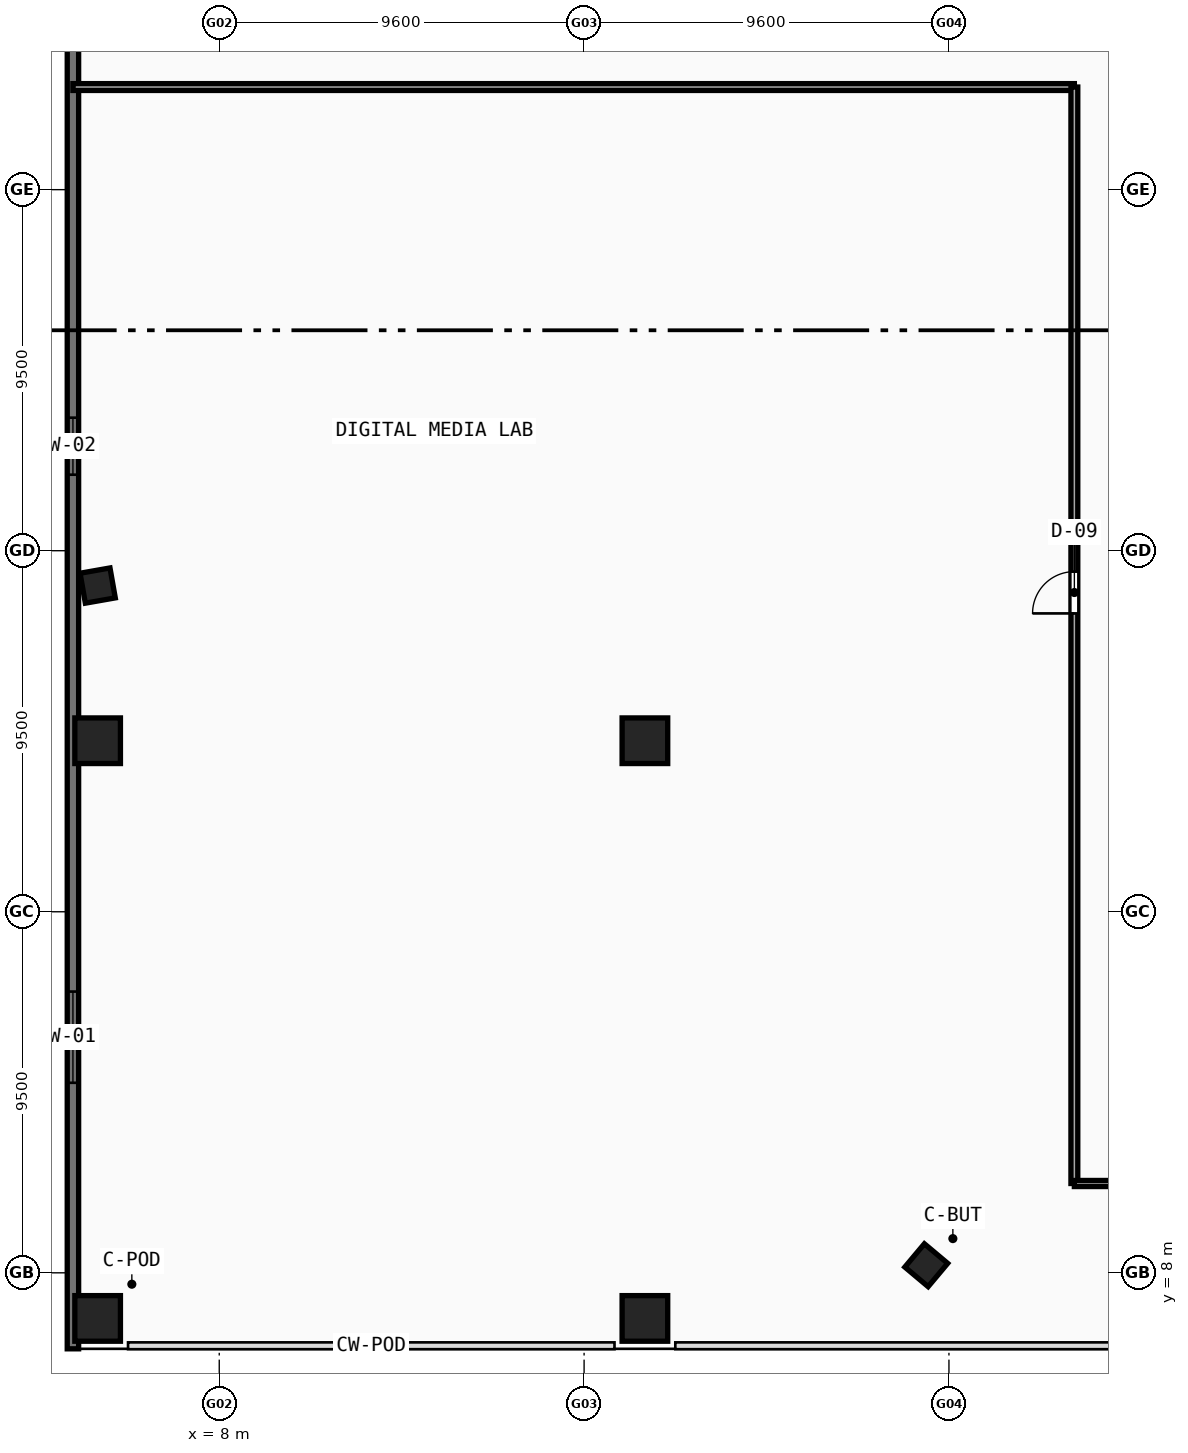
"""IFC4 building model, lengths in metres.
Left out: names, types, materials, properties, quantities, classifications, styles, units other than length and angle.
Written with IfcOpenShell. Run it as: python <this file> out.ifc"""

import sys

from ifc_helpers import new_model, si_unit, direction, frame, frame_2d, origin, origin_with_axes, origin_2d, place, context, subcontext, project, spatial, rectangle, hollow_rectangle, extrude, source, transform, mapped, element, fill, save


model = new_model("IFC4")
c1 = context("Model", 3, precision=1e-05, world=origin(), true_north=direction((0.0, 1.0)))
c2 = subcontext(c1, "Body", "Model", "MODEL_VIEW")
j1 = project(units=[si_unit("LENGTHUNIT", "METRE"), si_unit("PLANEANGLEUNIT", "RADIAN")], contexts=[c1])
p1 = place(None, origin())
s1 = spatial("IfcSite", under=j1, at=p1, CompositionType="ELEMENT")
p2 = place(p1, origin())
s2 = spatial("IfcBuilding", under=s1, at=p2, CompositionType="ELEMENT")
p3 = place(p2, frame((0.0, 0.0, 14.4)))
s3 = spatial("IfcBuildingStorey", under=s2, at=p3, CompositionType="ELEMENT", Elevation=14.4)
m1 = source(origin(), c2, "Body", "SweptSolid", [
    extrude(hollow_rectangle(XDim=1.2, YDim=1.2, WallThickness=0.05, at=origin_2d()), origin(), (0.0, 0.0, 1.0), 4.8),
])
for number, where, z_axis, x_axis in (
    (1, (4.8, 6.8, -0.28), (0.0, 0.0, 1.0), (1.0, 0.0, 0.0)),
    (2, (4.8, 22.0, -0.28), (0.0, 0.0, 1.0), (1.0, 0.0, 0.0)),
    (3, (19.2, 6.8, -0.28), (0.0, 0.0, 1.0), (1.0, 0.0, 0.0)),
    (4, (19.2, 22.0, -0.28), (0.0, 0.0, 1.0), (1.0, 0.0, 0.0)),
):
    element("IfcColumn", number, at=place(p3, frame(where, z_axis=z_axis, x_axis=x_axis)), inside=s3, PredefinedType="COLUMN", context=c2, shape_type="MappedRepresentation", body=[
        mapped(m1, transform((0.0, 0.0, 0.0), scale=1.0)),
    ])
m2 = source(origin(), c2, "Body", "SweptSolid", [
    extrude(hollow_rectangle(XDim=0.8, YDim=0.8, WallThickness=0.032, at=origin_2d()), origin(), (0.0, 0.0, 1.0), 4.8),
])
for number, where, z_axis, x_axis in (
    (5, (26.603, 8.2, -0.28), (0.0, 0.0, 1.0), (0.766, -0.643, 0.0)),
    (6, (4.801, 26.083, -0.28), (0.0, 0.0, 1.0), (0.174, -0.985, 0.0)),
):
    element("IfcColumn", number, at=place(p3, frame(where, z_axis=z_axis, x_axis=x_axis)), inside=s3, PredefinedType="COLUMN", context=c2, shape_type="MappedRepresentation", body=[
        mapped(m2, transform((0.0, 0.0, 0.0), scale=1.0)),
    ])
p4 = place(p3, frame((4.15, 6.0, 0.0), z_axis=(0.0, 0.0, 1.0), x_axis=(0.0, 1.0, 0.0)))
e7 = element("IfcWall", 7, at=p4, inside=s3, PredefinedType="STANDARD", context=c2, shape_type="SweptSolid", body=[
    extrude(rectangle(XDim=76.0, YDim=0.3, at=frame_2d((38.0, 0.0))), origin(), (0.0, 0.0, 1.0), 4.52),
])
p5 = place(p4, frame((7.0, 0.0, 0.9)))
e8 = element("IfcOpeningElement", 8, at=p5, cuts=e7, PredefinedType="OPENING", context=c2, shape_type="SweptSolid", body=[
    extrude(rectangle(XDim=2.4, YDim=1.8, at=frame_2d((1.2, 0.9))), frame((0.0, 0.16, 0.0), z_axis=(0.0, -1.0, 0.0), x_axis=(1.0, 0.0, 0.0)), (0.0, 0.0, 1.0), 0.32),
])
p6 = place(p4, frame((23.0, 0.0, 0.9)))
e9 = element("IfcOpeningElement", 9, at=p6, cuts=e7, PredefinedType="OPENING", context=c2, shape_type="SweptSolid", body=[
    extrude(rectangle(XDim=1.5, YDim=1.6, at=frame_2d((0.75, 0.8))), frame((0.0, 0.16, 0.0), z_axis=(0.0, -1.0, 0.0), x_axis=(1.0, 0.0, 0.0)), (0.0, 0.0, 1.0), 0.32),
])
p7 = place(p4, frame((43.0, 0.0, 0.9)))
e10 = element("IfcOpeningElement", 10, at=p7, cuts=e7, PredefinedType="OPENING", context=c2, shape_type="SweptSolid", body=[
    extrude(rectangle(XDim=2.4, YDim=1.8, at=frame_2d((1.2, 0.9))), frame((0.0, 0.16, 0.0), z_axis=(0.0, -1.0, 0.0), x_axis=(1.0, 0.0, 0.0)), (0.0, 0.0, 1.0), 0.32),
])
p8 = place(p4, frame((63.0, 0.0, 0.9)))
e11 = element("IfcOpeningElement", 11, at=p8, cuts=e7, PredefinedType="OPENING", context=c2, shape_type="SweptSolid", body=[
    extrude(rectangle(XDim=1.5, YDim=1.6, at=frame_2d((0.75, 0.8))), frame((0.0, 0.16, 0.0), z_axis=(0.0, -1.0, 0.0), x_axis=(1.0, 0.0, 0.0)), (0.0, 0.0, 1.0), 0.32),
])
p9 = place(p3, frame((4.15, 39.2, 0.0), z_axis=(0.0, 0.0, 1.0), x_axis=(1.0, 0.0, 0.0)))
e12 = element("IfcWall", 12, at=p9, inside=s3, PredefinedType="PARTITIONING", context=c2, shape_type="SweptSolid", body=[
    extrude(rectangle(XDim=26.35, YDim=0.18, at=frame_2d((13.175, 0.0))), origin(), (0.0, 0.0, 1.0), 3.62),
])
p10 = place(p3, frame((30.5, 10.35, 0.0), z_axis=(0.0, 0.0, 1.0), x_axis=(0.0, 1.0, 0.0)))
e13 = element("IfcWall", 13, at=p10, inside=s3, PredefinedType="PARTITIONING", context=c2, shape_type="SweptSolid", body=[
    extrude(rectangle(XDim=28.85, YDim=0.18, at=frame_2d((14.425, 0.0))), origin(), (0.0, 0.0, 1.0), 3.62),
])
p11 = place(p10, frame((15.0, 0.0, 0.0)))
e14 = element("IfcOpeningElement", 14, at=p11, cuts=e13, PredefinedType="OPENING", context=c2, shape_type="SweptSolid", body=[
    extrude(rectangle(XDim=1.1, YDim=2.15, at=frame_2d((0.55, 1.075))), frame((0.0, 0.1, 0.0), z_axis=(0.0, -1.0, 0.0), x_axis=(1.0, 0.0, 0.0)), (0.0, 0.0, 1.0), 0.2),
])
p12 = place(p3, frame((30.5, 10.35, 0.0), z_axis=(0.0, 0.0, 1.0), x_axis=(1.0, 0.0, 0.0)))
e15 = element("IfcWall", 15, at=p12, inside=s3, PredefinedType="PARTITIONING", context=c2, shape_type="SweptSolid", body=[
    extrude(rectangle(XDim=35.0, YDim=0.16, at=frame_2d((17.5, 0.0))), origin(), (0.0, 0.0, 1.0), 3.62),
])
m3 = source(origin(), c2, "Body", "SweptSolid", [
    extrude(rectangle(XDim=2.4, YDim=1.8, at=frame_2d((1.2, 0.9))), frame((0.0, 0.03, 0.0), z_axis=(0.0, -1.0, 0.0), x_axis=(1.0, 0.0, 0.0)), (0.0, 0.0, 1.0), 0.06),
])
p13 = place(p5, origin_with_axes())
e16 = element("IfcWindow", 16, at=p13, inside=s3, PartitioningType="SINGLE_PANEL", PredefinedType="WINDOW", context=c2, shape_type="MappedRepresentation", body=[
    mapped(m3, transform((0.0, 0.0, 0.0), scale=1.0)),
])
fill(e8, e16)
m4 = source(origin(), c2, "Body", "SweptSolid", [
    extrude(rectangle(XDim=1.5, YDim=1.6, at=frame_2d((0.75, 0.8))), frame((0.0, 0.03, 0.0), z_axis=(0.0, -1.0, 0.0), x_axis=(1.0, 0.0, 0.0)), (0.0, 0.0, 1.0), 0.06),
])
p14 = place(p6, origin_with_axes())
e17 = element("IfcWindow", 17, at=p14, inside=s3, PartitioningType="SINGLE_PANEL", PredefinedType="WINDOW", context=c2, shape_type="MappedRepresentation", body=[
    mapped(m4, transform((0.0, 0.0, 0.0), scale=1.0)),
])
fill(e9, e17)
m5 = source(origin(), c2, "Body", "SweptSolid", [
    extrude(rectangle(XDim=1.1, YDim=2.15, at=frame_2d((0.55, 1.075))), frame((0.0, 0.025, 0.0), z_axis=(0.0, -1.0, 0.0), x_axis=(1.0, 0.0, 0.0)), (0.0, 0.0, 1.0), 0.05),
])
p15 = place(p11, origin_with_axes())
e18 = element("IfcDoor", 18, at=p15, inside=s3, OperationType="SINGLE_SWING_LEFT", PredefinedType="DOOR", context=c2, shape_type="MappedRepresentation", body=[
    mapped(m5, transform((0.0, 0.0, 0.0), scale=1.0)),
])
fill(e14, e18)
save(model, sys.argv[1])
